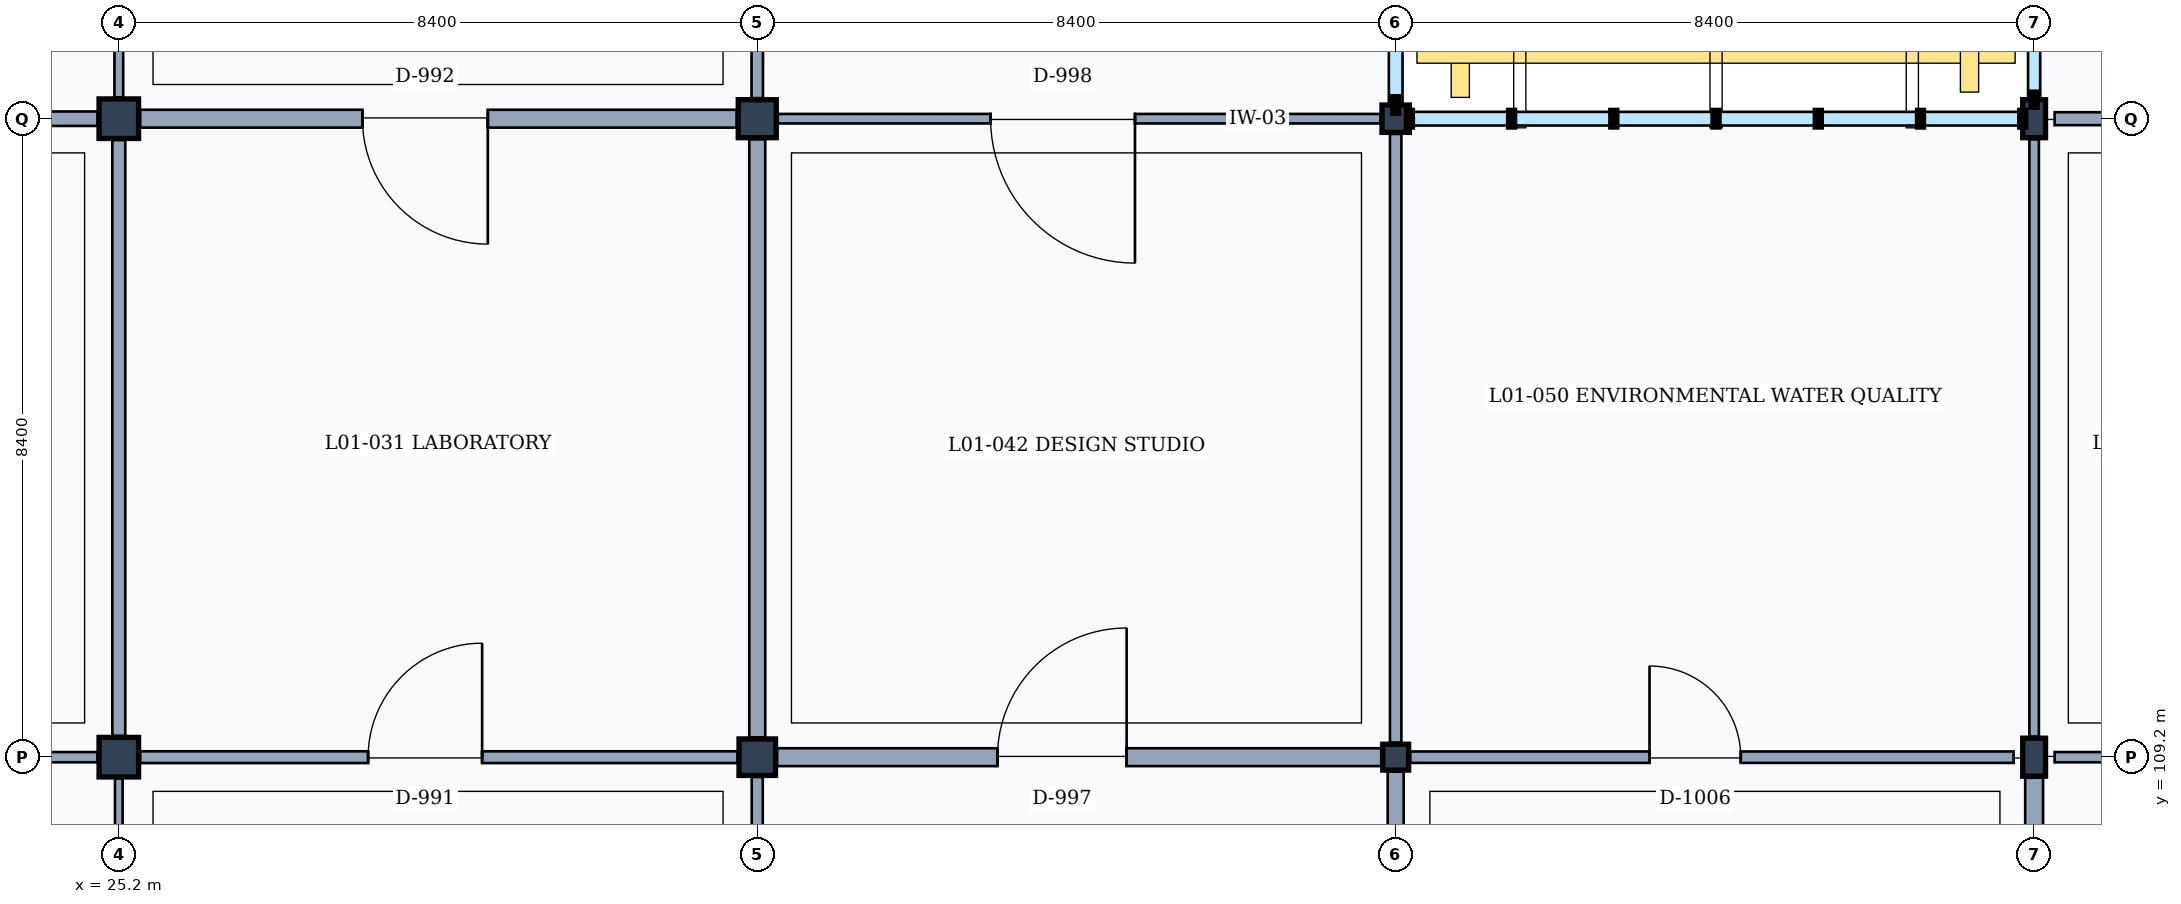
"""IFC4 building model, lengths in metres.
Left out: names, types, materials, properties, quantities, classifications, styles, units other than length and angle.
Written with IfcOpenShell. Run it as: python <this file> out.ifc"""

import sys

from ifc_helpers import new_model, si_unit, direction, frame, frame_2d, origin, origin_2d, place, context, subcontext, project, spatial, rectangle, i_section, extrude, element, fill, save


model = new_model("IFC4")
c1 = context("Model", 3, precision=1e-05, world=origin(), true_north=direction((0.0, 1.0)))
c2 = subcontext(c1, "Body", "Model", "MODEL_VIEW")
j1 = project(units=[si_unit("LENGTHUNIT", "METRE"), si_unit("PLANEANGLEUNIT", "RADIAN")], contexts=[c1])
p1 = place(None, origin())
s1 = spatial("IfcSite", under=j1, at=p1, CompositionType="ELEMENT")
p2 = place(p1, origin())
s2 = spatial("IfcBuilding", under=s1, at=p2, CompositionType="ELEMENT")
p3 = place(p2, frame((0.0, 0.0, 4.8)))
s3 = spatial("IfcBuildingStorey", under=s2, at=p3, CompositionType="ELEMENT", Elevation=4.8)
for number, where, z_axis, x_axis in (
    (1, (25.2, 109.2, 0.0), (0.0, 0.0, 1.0), (1.0, 0.0, 0.0)),
    (2, (25.2, 117.6, 0.0), (0.0, 0.0, 1.0), (1.0, 0.0, 0.0)),
):
    element("IfcColumn", number, at=place(p3, frame(where, z_axis=z_axis, x_axis=x_axis)), inside=s3, PredefinedType="COLUMN", context=c2, shape_type="SweptSolid", body=[
        extrude(rectangle(XDim=0.52, YDim=0.52, at=origin_2d()), origin(), (0.0, 0.0, 1.0), 4.8),
    ])
p4 = place(p3, frame((33.6, 109.2, 0.0), z_axis=(0.0, 0.0, 1.0), x_axis=(1.0, 0.0, 0.0)))
e3 = element("IfcColumn", 3, at=p4, inside=s3, PredefinedType="COLUMN", context=c2, shape_type="SweptSolid", body=[
    extrude(rectangle(XDim=0.48, YDim=0.48, at=origin_2d()), origin(), (0.0, 0.0, 1.0), 4.8),
])
p5 = place(p3, frame((33.6, 117.6, 0.0), z_axis=(0.0, 0.0, 1.0), x_axis=(1.0, 0.0, 0.0)))
e4 = element("IfcColumn", 4, at=p5, inside=s3, PredefinedType="COLUMN", context=c2, shape_type="SweptSolid", body=[
    extrude(rectangle(XDim=0.5, YDim=0.5, at=origin_2d()), origin(), (0.0, 0.0, 1.0), 4.8),
])
p6 = place(p3, frame((42.0, 109.2, 0.0), z_axis=(0.0, 0.0, 1.0), x_axis=(1.0, 0.0, 0.0)))
e5 = element("IfcColumn", 5, at=p6, inside=s3, PredefinedType="COLUMN", context=c2, shape_type="SweptSolid", body=[
    extrude(rectangle(XDim=0.34, YDim=0.34, at=origin_2d()), origin(), (0.0, 0.0, 1.0), 4.8),
])
p7 = place(p3, frame((42.0, 117.6, 0.0), z_axis=(0.0, 0.0, 1.0), x_axis=(1.0, 0.0, 0.0)))
e6 = element("IfcColumn", 6, at=p7, inside=s3, PredefinedType="COLUMN", context=c2, shape_type="SweptSolid", body=[
    extrude(rectangle(XDim=0.36, YDim=0.36, at=origin_2d()), origin(), (0.0, 0.0, 1.0), 4.8),
])
for number, where, z_axis, x_axis in (
    (7, (50.4, 109.2, 0.0), (0.0, 0.0, 1.0), (1.0, 0.0, 0.0)),
    (8, (50.4, 117.6, 0.0), (0.0, 0.0, 1.0), (1.0, 0.0, 0.0)),
):
    element("IfcColumn", number, at=place(p3, frame(where, z_axis=z_axis, x_axis=x_axis)), inside=s3, PredefinedType="COLUMN", context=c2, shape_type="SweptSolid", body=[
        extrude(i_section(OverallWidth=0.3, OverallDepth=0.5, WebThickness=0.014, FlangeThickness=0.028, FilletRadius=0.027, at=origin_2d()), origin(), (0.0, 0.0, 1.0), 4.8),
    ])
p8 = place(p3, frame((25.2, 101.08, 0.0), z_axis=(0.0, 0.0, 1.0), x_axis=(0.0, 1.0, 0.0)))
e9 = element("IfcWall", 9, at=p8, inside=s3, PredefinedType="MOVABLE", context=c2, shape_type="SweptSolid", body=[
    extrude(rectangle(XDim=7.84, YDim=0.1, at=frame_2d((3.92, 0.0))), origin(), (0.0, 0.0, 1.0), 3.92),
])
p9 = place(p8, frame((2.8, 0.0, 0.0)))
e10 = element("IfcOpeningElement", 10, at=p9, cuts=e9, PredefinedType="OPENING", context=c2, shape_type="SweptSolid", body=[
    extrude(rectangle(XDim=1.9, YDim=2.4, at=frame_2d((0.95, 1.2))), frame((0.0, 0.06, 0.0), z_axis=(0.0, -1.0, 0.0), x_axis=(1.0, 0.0, 0.0)), (0.0, 0.0, 1.0), 0.12),
])
p10 = place(p3, frame((17.08, 109.2, 0.0), z_axis=(0.0, 0.0, 1.0), x_axis=(1.0, 0.0, 0.0)))
e11 = element("IfcWall", 11, at=p10, inside=s3, PredefinedType="PARTITIONING", context=c2, shape_type="SweptSolid", body=[
    extrude(rectangle(XDim=7.84, YDim=0.135, at=frame_2d((3.92, 0.0))), origin(), (0.0, 0.0, 1.0), 3.92),
])
p11 = place(p10, frame((3.3, 0.0, 0.0)))
e12 = element("IfcOpeningElement", 12, at=p11, cuts=e11, PredefinedType="OPENING", context=c2, shape_type="SweptSolid", body=[
    extrude(rectangle(XDim=0.9, YDim=2.1, at=frame_2d((0.45, 1.05))), frame((0.0, 0.077, 0.0), z_axis=(0.0, -1.0, 0.0), x_axis=(1.0, 0.0, 0.0)), (0.0, 0.0, 1.0), 0.155),
])
p12 = place(p3, frame((25.2, 109.48, 0.0), z_axis=(0.0, 0.0, 1.0), x_axis=(0.0, 1.0, 0.0)))
e13 = element("IfcWall", 13, at=p12, inside=s3, PredefinedType="PARTITIONING", context=c2, shape_type="SweptSolid", body=[
    extrude(rectangle(XDim=7.84, YDim=0.17, at=frame_2d((3.92, 0.0))), origin(), (0.0, 0.0, 1.0), 3.92),
])
p13 = place(p3, frame((17.08, 117.6, 0.0), z_axis=(0.0, 0.0, 1.0), x_axis=(1.0, 0.0, 0.0)))
e14 = element("IfcWall", 14, at=p13, inside=s3, PredefinedType="PARTITIONING", context=c2, shape_type="SweptSolid", body=[
    extrude(rectangle(XDim=7.84, YDim=0.19, at=frame_2d((3.92, 0.0))), origin(), (0.0, 0.0, 1.0), 3.92),
])
p14 = place(p13, frame((3.125, 0.0, 0.0)))
e15 = element("IfcOpeningElement", 15, at=p14, cuts=e14, PredefinedType="OPENING", context=c2, shape_type="SweptSolid", body=[
    extrude(rectangle(XDim=1.25, YDim=2.3, at=frame_2d((0.625, 1.15))), frame((0.0, 0.105, 0.0), z_axis=(0.0, -1.0, 0.0), x_axis=(1.0, 0.0, 0.0)), (0.0, 0.0, 1.0), 0.21),
])
p15 = place(p3, frame((25.2, 117.88, 0.0), z_axis=(0.0, 0.0, 1.0), x_axis=(0.0, 1.0, 0.0)))
e16 = element("IfcWall", 16, at=p15, inside=s3, PredefinedType="PARTITIONING", context=c2, shape_type="SweptSolid", body=[
    extrude(rectangle(XDim=7.84, YDim=0.115, at=frame_2d((3.92, 0.0))), origin(), (0.0, 0.0, 1.0), 3.92),
])
p16 = place(p3, frame((33.6, 101.07, 0.0), z_axis=(0.0, 0.0, 1.0), x_axis=(0.0, 1.0, 0.0)))
e17 = element("IfcWall", 17, at=p16, inside=s3, PredefinedType="PARTITIONING", context=c2, shape_type="SweptSolid", body=[
    extrude(rectangle(XDim=7.87, YDim=0.145, at=frame_2d((3.935, 0.0))), origin(), (0.0, 0.0, 1.0), 3.92),
])
p17 = place(p16, frame((3.05, 0.0, 0.0)))
e18 = element("IfcOpeningElement", 18, at=p17, cuts=e17, PredefinedType="OPENING", context=c2, shape_type="SweptSolid", body=[
    extrude(rectangle(XDim=1.4, YDim=2.25, at=frame_2d((0.7, 1.125))), frame((0.0, 0.083, 0.0), z_axis=(0.0, -1.0, 0.0), x_axis=(1.0, 0.0, 0.0)), (0.0, 0.0, 1.0), 0.165),
])
p18 = place(p3, frame((25.48, 109.2, 0.0), z_axis=(0.0, 0.0, 1.0), x_axis=(1.0, 0.0, 0.0)))
e19 = element("IfcWall", 19, at=p18, inside=s3, PredefinedType="PARTITIONING", context=c2, shape_type="SweptSolid", body=[
    extrude(rectangle(XDim=7.86, YDim=0.155, at=frame_2d((3.93, 0.0))), origin(), (0.0, 0.0, 1.0), 3.89),
])
p19 = place(p18, frame((3.0, 0.0, 0.0)))
e20 = element("IfcOpeningElement", 20, at=p19, cuts=e19, PredefinedType="OPENING", context=c2, shape_type="SweptSolid", body=[
    extrude(rectangle(XDim=1.5, YDim=2.3, at=frame_2d((0.75, 1.15))), frame((0.0, 0.087, 0.0), z_axis=(0.0, -1.0, 0.0), x_axis=(1.0, 0.0, 0.0)), (0.0, 0.0, 1.0), 0.175),
])
p20 = place(p3, frame((33.6, 109.46, 0.0), z_axis=(0.0, 0.0, 1.0), x_axis=(0.0, 1.0, 0.0)))
e21 = element("IfcWall", 21, at=p20, inside=s3, PredefinedType="PARTITIONING", context=c2, shape_type="SweptSolid", body=[
    extrude(rectangle(XDim=7.87, YDim=0.21, at=frame_2d((3.935, 0.0))), origin(), (0.0, 0.0, 1.0), 3.92),
])
p21 = place(p3, frame((25.48, 117.6, 0.0), z_axis=(0.0, 0.0, 1.0), x_axis=(1.0, 0.0, 0.0)))
e22 = element("IfcWall", 22, at=p21, inside=s3, PredefinedType="PARTITIONING", context=c2, shape_type="SweptSolid", body=[
    extrude(rectangle(XDim=7.85, YDim=0.235, at=frame_2d((3.925, 0.0))), origin(), (0.0, 0.0, 1.0), 3.89),
])
p22 = place(p21, frame((2.925, 0.0, 0.0)))
e23 = element("IfcOpeningElement", 23, at=p22, cuts=e22, PredefinedType="OPENING", context=c2, shape_type="SweptSolid", body=[
    extrude(rectangle(XDim=1.65, YDim=2.25, at=frame_2d((0.825, 1.125))), frame((0.0, 0.127, 0.0), z_axis=(0.0, -1.0, 0.0), x_axis=(1.0, 0.0, 0.0)), (0.0, 0.0, 1.0), 0.255),
])
p23 = place(p3, frame((33.6, 117.87, 0.0), z_axis=(0.0, 0.0, 1.0), x_axis=(0.0, 1.0, 0.0)))
e24 = element("IfcWall", 24, at=p23, inside=s3, PredefinedType="PARTITIONING", context=c2, shape_type="SweptSolid", body=[
    extrude(rectangle(XDim=7.89, YDim=0.15, at=frame_2d((3.945, 0.0))), origin(), (0.0, 0.0, 1.0), 3.92),
])
p24 = place(p3, frame((42.0, 101.0, 0.0), z_axis=(0.0, 0.0, 1.0), x_axis=(0.0, 1.0, 0.0)))
e25 = element("IfcWall", 25, at=p24, inside=s3, PredefinedType="PARTITIONING", context=c2, shape_type="SweptSolid", body=[
    extrude(rectangle(XDim=8.01, YDim=0.21, at=frame_2d((4.005, 0.0))), origin(), (0.0, 0.0, 1.0), 3.92),
])
p25 = place(p24, frame((2.975, 0.0, 0.0)))
e26 = element("IfcOpeningElement", 26, at=p25, cuts=e25, PredefinedType="OPENING", context=c2, shape_type="SweptSolid", body=[
    extrude(rectangle(XDim=1.55, YDim=2.35, at=frame_2d((0.775, 1.175))), frame((0.0, 0.115, 0.0), z_axis=(0.0, -1.0, 0.0), x_axis=(1.0, 0.0, 0.0)), (0.0, 0.0, 1.0), 0.23),
])
p26 = place(p3, frame((33.86, 109.2, 0.0), z_axis=(0.0, 0.0, 1.0), x_axis=(1.0, 0.0, 0.0)))
e27 = element("IfcWall", 27, at=p26, inside=s3, PredefinedType="PARTITIONING", context=c2, shape_type="SweptSolid", body=[
    extrude(rectangle(XDim=7.95, YDim=0.235, at=frame_2d((3.975, 0.0))), origin(), (0.0, 0.0, 1.0), 3.89),
])
p27 = place(p26, frame((2.9, 0.0, 0.0)))
e28 = element("IfcOpeningElement", 28, at=p27, cuts=e27, PredefinedType="OPENING", context=c2, shape_type="SweptSolid", body=[
    extrude(rectangle(XDim=1.7, YDim=2.3, at=frame_2d((0.85, 1.15))), frame((0.0, 0.127, 0.0), z_axis=(0.0, -1.0, 0.0), x_axis=(1.0, 0.0, 0.0)), (0.0, 0.0, 1.0), 0.255),
])
p28 = place(p3, frame((42.0, 109.39, 0.0), z_axis=(0.0, 0.0, 1.0), x_axis=(0.0, 1.0, 0.0)))
e29 = element("IfcWall", 29, at=p28, inside=s3, PredefinedType="PARTITIONING", context=c2, shape_type="SweptSolid", body=[
    extrude(rectangle(XDim=8.01, YDim=0.15, at=frame_2d((4.005, 0.0))), origin(), (0.0, 0.0, 1.0), 3.92),
])
p29 = place(p3, frame((33.87, 117.6, 0.0), z_axis=(0.0, 0.0, 1.0), x_axis=(1.0, 0.0, 0.0)))
e30 = element("IfcWall", 30, at=p29, inside=s3, PredefinedType="PARTITIONING", context=c2, shape_type="SweptSolid", body=[
    extrude(rectangle(XDim=7.93, YDim=0.125, at=frame_2d((3.965, 0.0))), origin(), (0.0, 0.0, 1.0), 3.89),
])
p30 = place(p29, frame((2.8, 0.0, 0.0)))
e31 = element("IfcOpeningElement", 31, at=p30, cuts=e30, PredefinedType="OPENING", context=c2, shape_type="SweptSolid", body=[
    extrude(rectangle(XDim=1.9, YDim=2.4, at=frame_2d((0.95, 1.2))), frame((0.0, 0.073, 0.0), z_axis=(0.0, -1.0, 0.0), x_axis=(1.0, 0.0, 0.0)), (0.0, 0.0, 1.0), 0.145),
])
p31 = place(p3, frame((50.4, 101.07, 0.0), z_axis=(0.0, 0.0, 1.0), x_axis=(0.0, 1.0, 0.0)))
e32 = element("IfcWall", 32, at=p31, inside=s3, PredefinedType="PARTITIONING", context=c2, shape_type="SweptSolid", body=[
    extrude(rectangle(XDim=7.86, YDim=0.235, at=frame_2d((3.93, 0.0))), origin(), (0.0, 0.0, 1.0), 3.92),
])
p32 = place(p31, frame((2.85, 0.0, 0.0)))
e33 = element("IfcOpeningElement", 33, at=p32, cuts=e32, PredefinedType="OPENING", context=c2, shape_type="SweptSolid", body=[
    extrude(rectangle(XDim=1.8, YDim=2.3, at=frame_2d((0.9, 1.15))), frame((0.0, 0.127, 0.0), z_axis=(0.0, -1.0, 0.0), x_axis=(1.0, 0.0, 0.0)), (0.0, 0.0, 1.0), 0.255),
])
p33 = place(p3, frame((42.19, 109.2, 0.0), z_axis=(0.0, 0.0, 1.0), x_axis=(1.0, 0.0, 0.0)))
e34 = element("IfcWall", 34, at=p33, inside=s3, PredefinedType="PARTITIONING", context=c2, shape_type="SweptSolid", body=[
    extrude(rectangle(XDim=7.94, YDim=0.15, at=frame_2d((3.97, 0.0))), origin(), (0.0, 0.0, 1.0), 3.89),
])
p34 = place(p33, frame((3.15, 0.0, 0.0)))
e35 = element("IfcOpeningElement", 35, at=p34, cuts=e34, PredefinedType="OPENING", context=c2, shape_type="SweptSolid", body=[
    extrude(rectangle(XDim=1.2, YDim=2.2, at=frame_2d((0.6, 1.1))), frame((0.0, 0.085, 0.0), z_axis=(0.0, -1.0, 0.0), x_axis=(1.0, 0.0, 0.0)), (0.0, 0.0, 1.0), 0.17),
])
p35 = place(p3, frame((50.4, 109.47, 0.0), z_axis=(0.0, 0.0, 1.0), x_axis=(0.0, 1.0, 0.0)))
e36 = element("IfcWall", 36, at=p35, inside=s3, PredefinedType="PARTITIONING", context=c2, shape_type="SweptSolid", body=[
    extrude(rectangle(XDim=7.86, YDim=0.125, at=frame_2d((3.93, 0.0))), origin(), (0.0, 0.0, 1.0), 3.92),
])
p36 = place(p3, frame((50.67, 109.2, 0.0), z_axis=(0.0, 0.0, 1.0), x_axis=(1.0, 0.0, 0.0)))
e37 = element("IfcWall", 37, at=p36, inside=s3, PredefinedType="PARTITIONING", context=c2, shape_type="SweptSolid", body=[
    extrude(rectangle(XDim=7.9, YDim=0.135, at=frame_2d((3.95, 0.0))), origin(), (0.0, 0.0, 1.0), 3.92),
])
p37 = place(p36, frame((3.175, 0.0, 0.0)))
e38 = element("IfcOpeningElement", 38, at=p37, cuts=e37, PredefinedType="OPENING", context=c2, shape_type="SweptSolid", body=[
    extrude(rectangle(XDim=1.15, YDim=2.25, at=frame_2d((0.575, 1.125))), frame((0.0, 0.077, 0.0), z_axis=(0.0, -1.0, 0.0), x_axis=(1.0, 0.0, 0.0)), (0.0, 0.0, 1.0), 0.155),
])
p38 = place(p3, frame((50.67, 117.6, 0.0), z_axis=(0.0, 0.0, 1.0), x_axis=(1.0, 0.0, 0.0)))
e39 = element("IfcWall", 39, at=p38, inside=s3, PredefinedType="PARTITIONING", context=c2, shape_type="SweptSolid", body=[
    extrude(rectangle(XDim=7.9, YDim=0.17, at=frame_2d((3.95, 0.0))), origin(), (0.0, 0.0, 1.0), 3.92),
])
p39 = place(p38, frame((3.1, 0.0, 0.0)))
e40 = element("IfcOpeningElement", 40, at=p39, cuts=e39, PredefinedType="OPENING", context=c2, shape_type="SweptSolid", body=[
    extrude(rectangle(XDim=1.3, YDim=2.2, at=frame_2d((0.65, 1.1))), frame((0.0, 0.095, 0.0), z_axis=(0.0, -1.0, 0.0), x_axis=(1.0, 0.0, 0.0)), (0.0, 0.0, 1.0), 0.19),
])
p40 = place(p19, origin())
e41 = element("IfcDoor", 41, at=p40, inside=s3, OperationType="SINGLE_SWING_RIGHT", PredefinedType="DOOR", context=c2, shape_type="SweptSolid", body=[
    extrude(rectangle(XDim=1.5, YDim=2.3, at=frame_2d((0.75, 1.15))), frame((0.0, 0.025, 0.0), z_axis=(0.0, -1.0, 0.0), x_axis=(1.0, 0.0, 0.0)), (0.0, 0.0, 1.0), 0.05),
])
fill(e20, e41)
p41 = place(p22, frame((1.65, 0.0, 0.0), z_axis=(0.0, 0.0, 1.0), x_axis=(-1.0, 0.0, 0.0)))
e42 = element("IfcDoor", 42, at=p41, inside=s3, OperationType="SINGLE_SWING_LEFT", PredefinedType="DOOR", context=c2, shape_type="SweptSolid", body=[
    extrude(rectangle(XDim=1.65, YDim=2.25, at=frame_2d((0.825, 1.125))), frame((0.0, 0.025, 0.0), z_axis=(0.0, -1.0, 0.0), x_axis=(1.0, 0.0, 0.0)), (0.0, 0.0, 1.0), 0.05),
])
fill(e23, e42)
p42 = place(p27, origin())
e43 = element("IfcDoor", 43, at=p42, inside=s3, OperationType="SINGLE_SWING_RIGHT", PredefinedType="DOOR", context=c2, shape_type="SweptSolid", body=[
    extrude(rectangle(XDim=1.7, YDim=2.3, at=frame_2d((0.85, 1.15))), frame((0.0, 0.025, 0.0), z_axis=(0.0, -1.0, 0.0), x_axis=(1.0, 0.0, 0.0)), (0.0, 0.0, 1.0), 0.05),
])
fill(e28, e43)
p43 = place(p30, frame((1.9, 0.0, 0.0), z_axis=(0.0, 0.0, 1.0), x_axis=(-1.0, 0.0, 0.0)))
e44 = element("IfcDoor", 44, at=p43, inside=s3, OperationType="SINGLE_SWING_LEFT", PredefinedType="DOOR", context=c2, shape_type="SweptSolid", body=[
    extrude(rectangle(XDim=1.9, YDim=2.4, at=frame_2d((0.95, 1.2))), frame((0.0, 0.025, 0.0), z_axis=(0.0, -1.0, 0.0), x_axis=(1.0, 0.0, 0.0)), (0.0, 0.0, 1.0), 0.05),
])
fill(e31, e44)
p44 = place(p34, origin())
e45 = element("IfcDoor", 45, at=p44, inside=s3, OperationType="SINGLE_SWING_LEFT", PredefinedType="DOOR", context=c2, shape_type="SweptSolid", body=[
    extrude(rectangle(XDim=1.2, YDim=2.2, at=frame_2d((0.6, 1.1))), frame((0.0, 0.025, 0.0), z_axis=(0.0, -1.0, 0.0), x_axis=(1.0, 0.0, 0.0)), (0.0, 0.0, 1.0), 0.05),
])
fill(e35, e45)
save(model, sys.argv[1])
